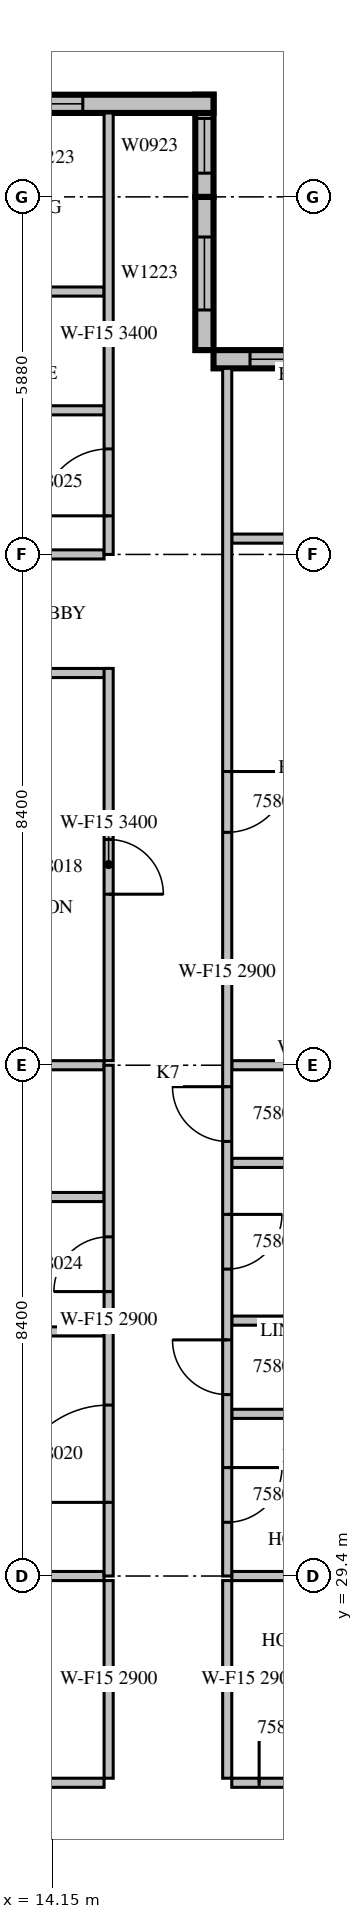
"""IFC4 building model, lengths in metres.
Left out: names, types, materials, properties, quantities, classifications, styles, units other than length and angle.
Written with IfcOpenShell. Run it as: python <this file> out.ifc"""

import sys

from ifc_helpers import new_model, si_unit, direction, frame, frame_2d, origin, place, context, subcontext, project, spatial, rectangle, extrude, source, transform, mapped, element, fill, save


model = new_model("IFC4")
c1 = context("Model", 3, precision=1e-05, world=origin(), true_north=direction((0.0, 1.0)))
c2 = subcontext(c1, "Body", "Model", "MODEL_VIEW")
j1 = project(units=[si_unit("LENGTHUNIT", "METRE"), si_unit("PLANEANGLEUNIT", "RADIAN")], contexts=[c1])
p1 = place(None, origin())
s1 = spatial("IfcSite", under=j1, at=p1, CompositionType="ELEMENT")
p2 = place(p1, origin())
s2 = spatial("IfcBuilding", under=s1, at=p2, CompositionType="ELEMENT")
p3 = place(p2, frame((0.0, 0.0, 253.8)))
s3 = spatial("IfcBuildingStorey", under=s2, at=p3, CompositionType="ELEMENT", Elevation=253.8)
m1 = source(origin(), c2, "Body", "SweptSolid", [
    extrude(rectangle(XDim=4.2, YDim=0.3, at=frame_2d((2.1, 0.0))), origin(), (0.0, 0.0, 1.0), 3.4),
])
p4 = place(p3, frame((21.0, 49.41, 0.0), z_axis=(0.0, 0.0, 1.0), x_axis=(-1.0, 0.0, 0.0)))
e1 = element("IfcWall", 1, at=p4, inside=s3, PredefinedType="STANDARD", context=c2, shape_type="MappedRepresentation", body=[
    mapped(m1, transform((0.0, 0.0, 0.0), scale=1.0)),
])
m2 = source(origin(), c2, "Body", "SweptSolid", [
    extrude(rectangle(XDim=3.0, YDim=2.3, at=frame_2d((1.5, 1.15))), frame((0.0, 0.16, 0.0), z_axis=(0.0, -1.0, 0.0), x_axis=(1.0, 0.0, 0.0)), (0.0, 0.0, 1.0), 0.32),
])
p5 = place(p4, frame((0.6, 0.0, 0.6)))
e2 = element("IfcOpeningElement", 2, at=p5, cuts=e1, PredefinedType="OPENING", context=c2, shape_type="MappedRepresentation", body=[
    mapped(m2, transform((0.0, 0.0, 0.0), scale=1.0)),
])
m3 = source(origin(), c2, "Body", "SweptSolid", [
    extrude(rectangle(XDim=2.52, YDim=0.3, at=frame_2d((1.26, 0.0))), origin(), (0.0, 0.0, 1.0), 3.4),
])
p6 = place(p3, frame((16.65, 49.56, 0.0), z_axis=(0.0, 0.0, 1.0), x_axis=(0.0, 1.0, 0.0)))
e3 = element("IfcWall", 3, at=p6, inside=s3, PredefinedType="STANDARD", context=c2, shape_type="MappedRepresentation", body=[
    mapped(m3, transform((0.0, 0.0, 0.0), scale=1.0)),
])
m4 = source(origin(), c2, "Body", "SweptSolid", [
    extrude(rectangle(XDim=1.2, YDim=2.3, at=frame_2d((0.6, 1.15))), frame((0.0, 0.16, 0.0), z_axis=(0.0, -1.0, 0.0), x_axis=(1.0, 0.0, 0.0)), (0.0, 0.0, 1.0), 0.32),
])
p7 = place(p6, frame((0.66, 0.0, 0.6)))
e4 = element("IfcOpeningElement", 4, at=p7, cuts=e3, PredefinedType="OPENING", context=c2, shape_type="MappedRepresentation", body=[
    mapped(m4, transform((0.0, 0.0, 0.0), scale=1.0)),
])
m5 = source(origin(), c2, "Body", "SweptSolid", [
    extrude(rectangle(XDim=1.68, YDim=0.3, at=frame_2d((0.84, 0.0))), origin(), (0.0, 0.0, 1.0), 3.4),
])
p8 = place(p3, frame((16.65, 52.08, 0.0), z_axis=(0.0, 0.0, 1.0), x_axis=(0.0, 1.0, 0.0)))
e5 = element("IfcWall", 5, at=p8, inside=s3, PredefinedType="STANDARD", context=c2, shape_type="MappedRepresentation", body=[
    mapped(m5, transform((0.0, 0.0, 0.0), scale=1.0)),
])
m6 = source(origin(), c2, "Body", "SweptSolid", [
    extrude(rectangle(XDim=0.9, YDim=2.3, at=frame_2d((0.45, 1.15))), frame((0.0, 0.16, 0.0), z_axis=(0.0, -1.0, 0.0), x_axis=(1.0, 0.0, 0.0)), (0.0, 0.0, 1.0), 0.32),
])
p9 = place(p8, frame((0.39, 0.0, 0.6)))
e6 = element("IfcOpeningElement", 6, at=p9, cuts=e5, PredefinedType="OPENING", context=c2, shape_type="MappedRepresentation", body=[
    mapped(m6, transform((0.0, 0.0, 0.0), scale=1.0)),
])
m7 = source(origin(), c2, "Body", "SweptSolid", [
    extrude(rectangle(XDim=10.5, YDim=0.3, at=frame_2d((5.25, 0.0))), origin(), (0.0, 0.0, 1.0), 3.4),
])
p10 = place(p3, frame((16.8, 53.61, 0.0), z_axis=(0.0, 0.0, 1.0), x_axis=(-1.0, 0.0, 0.0)))
e7 = element("IfcWall", 7, at=p10, inside=s3, PredefinedType="STANDARD", context=c2, shape_type="MappedRepresentation", body=[
    mapped(m7, transform((0.0, 0.0, 0.0), scale=1.0)),
])
p11 = place(p10, frame((2.15, 0.0, 0.6)))
e8 = element("IfcOpeningElement", 8, at=p11, cuts=e7, PredefinedType="OPENING", context=c2, shape_type="MappedRepresentation", body=[
    mapped(m4, transform((0.0, 0.0, 0.0), scale=1.0)),
])
m8 = source(origin(), c2, "Body", "SweptSolid", [
    extrude(rectangle(XDim=1.8, YDim=2.3, at=frame_2d((0.9, 1.15))), frame((0.0, 0.16, 0.0), z_axis=(0.0, -1.0, 0.0), x_axis=(1.0, 0.0, 0.0)), (0.0, 0.0, 1.0), 0.32),
])
p12 = place(p10, frame((8.025, 0.0, 0.6)))
e9 = element("IfcOpeningElement", 9, at=p12, cuts=e7, PredefinedType="OPENING", context=c2, shape_type="MappedRepresentation", body=[
    mapped(m8, transform((0.0, 0.0, 0.0), scale=1.0)),
])
m9 = source(origin(), c2, "Body", "SweptSolid", [
    extrude(rectangle(XDim=8.495, YDim=0.15, at=frame_2d((4.247, 0.0))), origin(), (0.0, 0.0, 1.0), 2.4),
])
p13 = place(p3, frame((6.505, 26.0, 0.0), z_axis=(0.0, 0.0, 1.0), x_axis=(1.0, 0.0, 0.0)))
e10 = element("IfcWall", 10, at=p13, inside=s3, PredefinedType="PARTITIONING", context=c2, shape_type="MappedRepresentation", body=[
    mapped(m9, transform((0.0, 0.0, 0.0), scale=1.0)),
])
m10 = source(origin(), c2, "Body", "SweptSolid", [
    extrude(rectangle(XDim=0.9, YDim=2.1, at=frame_2d((0.45, 1.05))), frame((0.0, 0.085, 0.0), z_axis=(0.0, -1.0, 0.0), x_axis=(1.0, 0.0, 0.0)), (0.0, 0.0, 1.0), 0.17),
])
p14 = place(p13, frame((1.395, 0.0, 0.0)))
e11 = element("IfcOpeningElement", 11, at=p14, cuts=e10, PredefinedType="OPENING", context=c2, shape_type="MappedRepresentation", body=[
    mapped(m10, transform((0.0, 0.0, 0.0), scale=1.0)),
])
p15 = place(p13, frame((6.47, 0.0, 0.0)))
e12 = element("IfcOpeningElement", 12, at=p15, cuts=e10, PredefinedType="OPENING", context=c2, shape_type="MappedRepresentation", body=[
    mapped(m10, transform((0.0, 0.0, 0.0), scale=1.0)),
])
m11 = source(origin(), c2, "Body", "SweptSolid", [
    extrude(rectangle(XDim=3.6, YDim=0.15, at=frame_2d((1.8, 0.0))), origin(), (0.0, 0.0, 1.0), 2.4),
])
p16 = place(p3, frame((17.1, 26.0, 0.0), z_axis=(0.0, 0.0, 1.0), x_axis=(1.0, 0.0, 0.0)))
e13 = element("IfcWall", 13, at=p16, inside=s3, PredefinedType="PARTITIONING", context=c2, shape_type="MappedRepresentation", body=[
    mapped(m11, transform((0.0, 0.0, 0.0), scale=1.0)),
])
p17 = place(p16, frame((0.45, 0.0, 0.0)))
e14 = element("IfcOpeningElement", 14, at=p17, cuts=e13, PredefinedType="OPENING", context=c2, shape_type="MappedRepresentation", body=[
    mapped(m10, transform((0.0, 0.0, 0.0), scale=1.0)),
])
p18 = place(p3, frame((15.075, 26.075, 0.0), z_axis=(0.0, 0.0, 1.0), x_axis=(0.0, 1.0, 0.0)))
e15 = element("IfcWall", 15, at=p18, inside=s3, PredefinedType="PARTITIONING", context=c2, shape_type="SweptSolid", body=[
    extrude(rectangle(XDim=3.25, YDim=0.15, at=frame_2d((1.625, 0.0))), origin(), (0.0, 0.0, 1.0), 2.9),
])
m12 = source(origin(), c2, "Body", "SweptSolid", [
    extrude(rectangle(XDim=3.25, YDim=0.15, at=frame_2d((1.625, 0.0))), origin(), (0.0, 0.0, 1.0), 2.9),
])
p19 = place(p3, frame((17.025, 29.325, 0.0), z_axis=(0.0, 0.0, 1.0), x_axis=(0.0, -1.0, 0.0)))
e16 = element("IfcWall", 16, at=p19, inside=s3, PredefinedType="PARTITIONING", context=c2, shape_type="MappedRepresentation", body=[
    mapped(m12, transform((0.0, 0.0, 0.0), scale=1.0)),
])
m13 = source(origin(), c2, "Body", "SweptSolid", [
    extrude(rectangle(XDim=4.101, YDim=0.15, at=frame_2d((2.05, 0.0))), origin(), (0.0, 0.0, 1.0), 3.4),
])
p20 = place(p3, frame((15.0, 29.4, 0.0), z_axis=(0.0, 0.0, 1.0), x_axis=(-1.0, 0.0, 0.0)))
e17 = element("IfcWall", 17, at=p20, inside=s3, PredefinedType="PARTITIONING", context=c2, shape_type="MappedRepresentation", body=[
    mapped(m13, transform((0.0, 0.0, 0.0), scale=1.0)),
])
m14 = source(origin(), c2, "Body", "SweptSolid", [
    extrude(rectangle(XDim=3.101, YDim=0.15, at=frame_2d((1.55, 0.0))), origin(), (0.0, 0.0, 1.0), 3.4),
])
p21 = place(p3, frame((20.201, 29.4, 0.0), z_axis=(0.0, 0.0, 1.0), x_axis=(-1.0, 0.0, 0.0)))
e18 = element("IfcWall", 18, at=p21, inside=s3, PredefinedType="PARTITIONING", context=c2, shape_type="MappedRepresentation", body=[
    mapped(m14, transform((0.0, 0.0, 0.0), scale=1.0)),
])
m15 = source(origin(), c2, "Body", "SweptSolid", [
    extrude(rectangle(XDim=2.775, YDim=0.15, at=frame_2d((1.387, 0.0))), origin(), (0.0, 0.0, 1.0), 3.4),
])
p22 = place(p3, frame((15.075, 44.25, 0.0), z_axis=(0.0, 0.0, 1.0), x_axis=(-1.0, 0.0, 0.0)))
e19 = element("IfcWall", 19, at=p22, inside=s3, PredefinedType="PARTITIONING", context=c2, shape_type="MappedRepresentation", body=[
    mapped(m15, transform((0.0, 0.0, 0.0), scale=1.0)),
])
m16 = source(origin(), c2, "Body", "SweptSolid", [
    extrude(rectangle(XDim=6.45, YDim=0.15, at=frame_2d((3.225, 0.0))), origin(), (0.0, 0.0, 1.0), 3.4),
])
p23 = place(p3, frame((15.075, 37.875, 0.0), z_axis=(0.0, 0.0, 1.0), x_axis=(0.0, 1.0, 0.0)))
e20 = element("IfcWall", 20, at=p23, inside=s3, PredefinedType="PARTITIONING", context=c2, shape_type="MappedRepresentation", body=[
    mapped(m16, transform((0.0, 0.0, 0.0), scale=1.0)),
])
p24 = place(p23, frame((2.737, 0.0, 0.0)))
e21 = element("IfcOpeningElement", 21, at=p24, cuts=e20, PredefinedType="OPENING", context=c2, shape_type="MappedRepresentation", body=[
    mapped(m10, transform((0.0, 0.0, 0.0), scale=1.0)),
])
m17 = source(origin(), c2, "Body", "SweptSolid", [
    extrude(rectangle(XDim=3.95, YDim=0.15, at=frame_2d((1.975, 0.0))), origin(), (0.0, 0.0, 1.0), 3.4),
])
for number, where, z_axis, x_axis in (
    (22, (15.0, 33.422, 0.0), (0.0, 0.0, 1.0), (-1.0, 0.0, 0.0)),
    (23, (15.0, 35.633, 0.0), (0.0, 0.0, 1.0), (-1.0, 0.0, 0.0)),
    (24, (15.0, 37.8, 0.0), (0.0, 0.0, 1.0), (-1.0, 0.0, 0.0)),
    (25, (15.0, 48.57, 0.0), (0.0, 0.0, 1.0), (-1.0, 0.0, 0.0)),
    (26, (15.0, 50.523, 0.0), (0.0, 0.0, 1.0), (-1.0, 0.0, 0.0)),
    (27, (15.0, 46.2, 0.0), (0.0, 0.0, 1.0), (-1.0, 0.0, 0.0)),
):
    element("IfcWall", number, at=place(p3, frame(where, z_axis=z_axis, x_axis=x_axis)), inside=s3, PredefinedType="PARTITIONING", context=c2, shape_type="MappedRepresentation", body=[
        mapped(m17, transform((0.0, 0.0, 0.0), scale=1.0)),
    ])
for number, where, z_axis, x_axis in (
    (28, (17.1, 32.067, 0.0), (0.0, 0.0, 1.0), (1.0, 0.0, 0.0)),
    (29, (17.1, 36.194, 0.0), (0.0, 0.0, 1.0), (1.0, 0.0, 0.0)),
):
    element("IfcWall", number, at=place(p3, frame(where, z_axis=z_axis, x_axis=x_axis)), inside=s3, PredefinedType="PARTITIONING", context=c2, shape_type="MappedRepresentation", body=[
        mapped(m11, transform((0.0, 0.0, 0.0), scale=1.0)),
    ])
p25 = place(p3, frame((17.1, 46.46, 0.0), z_axis=(0.0, 0.0, 1.0), x_axis=(1.0, 0.0, 0.0)))
e30 = element("IfcWall", 30, at=p25, inside=s3, PredefinedType="PARTITIONING", context=c2, shape_type="MappedRepresentation", body=[
    mapped(m14, transform((0.0, 0.0, 0.0), scale=1.0)),
])
p26 = place(p25, frame((1.35, 0.0, 0.0)))
e31 = element("IfcOpeningElement", 31, at=p26, cuts=e30, PredefinedType="OPENING", context=c2, shape_type="MappedRepresentation", body=[
    mapped(m10, transform((0.0, 0.0, 0.0), scale=1.0)),
])
p27 = place(p3, frame((20.7, 33.6, 0.0), z_axis=(0.0, 0.0, 1.0), x_axis=(-1.0, 0.0, 0.0)))
e32 = element("IfcWall", 32, at=p27, inside=s3, PredefinedType="PARTITIONING", context=c2, shape_type="MappedRepresentation", body=[
    mapped(m11, transform((0.0, 0.0, 0.0), scale=1.0)),
])
p28 = place(p3, frame((20.201, 37.8, 0.0), z_axis=(0.0, 0.0, 1.0), x_axis=(-1.0, 0.0, 0.0)))
e33 = element("IfcWall", 33, at=p28, inside=s3, PredefinedType="PARTITIONING", context=c2, shape_type="MappedRepresentation", body=[
    mapped(m14, transform((0.0, 0.0, 0.0), scale=1.0)),
])
m18 = source(origin(), c2, "Body", "SweptSolid", [
    extrude(rectangle(XDim=8.4, YDim=0.15, at=frame_2d((4.2, 0.0))), origin(), (0.0, 0.0, 1.0), 2.9),
])
p29 = place(p3, frame((15.075, 29.4, 0.0), z_axis=(0.0, 0.0, 1.0), x_axis=(0.0, 1.0, 0.0)))
e34 = element("IfcWall", 34, at=p29, inside=s3, PredefinedType="PARTITIONING", context=c2, shape_type="MappedRepresentation", body=[
    mapped(m18, transform((0.0, 0.0, 0.0), scale=1.0)),
])
m19 = source(origin(), c2, "Body", "SweptSolid", [
    extrude(rectangle(XDim=1.6, YDim=2.1, at=frame_2d((0.8, 1.05))), frame((0.0, 0.085, 0.0), z_axis=(0.0, -1.0, 0.0), x_axis=(1.0, 0.0, 0.0)), (0.0, 0.0, 1.0), 0.17),
])
p30 = place(p29, frame((1.211, 0.0, 0.0)))
e35 = element("IfcOpeningElement", 35, at=p30, cuts=e34, PredefinedType="OPENING", context=c2, shape_type="MappedRepresentation", body=[
    mapped(m19, transform((0.0, 0.0, 0.0), scale=1.0)),
])
p31 = place(p29, frame((4.678, 0.0, 0.0)))
e36 = element("IfcOpeningElement", 36, at=p31, cuts=e34, PredefinedType="OPENING", context=c2, shape_type="MappedRepresentation", body=[
    mapped(m10, transform((0.0, 0.0, 0.0), scale=1.0)),
])
m20 = source(origin(), c2, "Body", "SweptSolid", [
    extrude(rectangle(XDim=7.26, YDim=0.15, at=frame_2d((3.63, 0.0))), origin(), (0.0, 0.0, 1.0), 3.4),
])
p32 = place(p3, frame((15.075, 46.2, 0.0), z_axis=(0.0, 0.0, 1.0), x_axis=(0.0, 1.0, 0.0)))
e37 = element("IfcWall", 37, at=p32, inside=s3, PredefinedType="PARTITIONING", context=c2, shape_type="MappedRepresentation", body=[
    mapped(m20, transform((0.0, 0.0, 0.0), scale=1.0)),
])
m21 = source(origin(), c2, "Body", "SweptSolid", [
    extrude(rectangle(XDim=1.1, YDim=2.1, at=frame_2d((0.55, 1.05))), frame((0.0, 0.085, 0.0), z_axis=(0.0, -1.0, 0.0), x_axis=(1.0, 0.0, 0.0)), (0.0, 0.0, 1.0), 0.17),
])
p33 = place(p32, frame((0.635, 0.0, 0.0)))
e38 = element("IfcOpeningElement", 38, at=p33, cuts=e37, PredefinedType="OPENING", context=c2, shape_type="MappedRepresentation", body=[
    mapped(m21, transform((0.0, 0.0, 0.0), scale=1.0)),
])
m22 = source(origin(), c2, "Body", "SweptSolid", [
    extrude(rectangle(XDim=19.86, YDim=0.15, at=frame_2d((9.93, 0.0))), origin(), (0.0, 0.0, 1.0), 2.9),
])
p34 = place(p3, frame((17.025, 49.26, 0.0), z_axis=(0.0, 0.0, 1.0), x_axis=(0.0, -1.0, 0.0)))
e39 = element("IfcWall", 39, at=p34, inside=s3, PredefinedType="PARTITIONING", context=c2, shape_type="MappedRepresentation", body=[
    mapped(m22, transform((0.0, 0.0, 0.0), scale=1.0)),
])
p35 = place(p34, frame((18.076, 0.0, 0.0)))
e40 = element("IfcOpeningElement", 40, at=p35, cuts=e39, PredefinedType="OPENING", context=c2, shape_type="MappedRepresentation", body=[
    mapped(m10, transform((0.0, 0.0, 0.0), scale=1.0)),
])
p36 = place(p34, frame((15.976, 0.0, 0.0)))
e41 = element("IfcOpeningElement", 41, at=p36, cuts=e39, PredefinedType="OPENING", context=c2, shape_type="MappedRepresentation", body=[
    mapped(m10, transform((0.0, 0.0, 0.0), scale=1.0)),
])
p37 = place(p34, frame((13.913, 0.0, 0.0)))
e42 = element("IfcOpeningElement", 42, at=p37, cuts=e39, PredefinedType="OPENING", context=c2, shape_type="MappedRepresentation", body=[
    mapped(m10, transform((0.0, 0.0, 0.0), scale=1.0)),
])
p38 = place(p34, frame((11.813, 0.0, 0.0)))
e43 = element("IfcOpeningElement", 43, at=p38, cuts=e39, PredefinedType="OPENING", context=c2, shape_type="MappedRepresentation", body=[
    mapped(m10, transform((0.0, 0.0, 0.0), scale=1.0)),
])
m23 = source(origin(), c2, "Body", "SweptSolid", [
    extrude(rectangle(XDim=1.0, YDim=2.1, at=frame_2d((0.5, 1.05))), frame((0.0, 0.085, 0.0), z_axis=(0.0, -1.0, 0.0), x_axis=(1.0, 0.0, 0.0)), (0.0, 0.0, 1.0), 0.17),
])
p39 = place(p34, frame((6.63, 0.0, 0.0)))
e44 = element("IfcOpeningElement", 44, at=p39, cuts=e39, PredefinedType="OPENING", context=c2, shape_type="MappedRepresentation", body=[
    mapped(m23, transform((0.0, 0.0, 0.0), scale=1.0)),
])
m24 = source(origin(), c2, "Body", "SweptSolid", [
    extrude(rectangle(XDim=3.0, YDim=2.3, at=frame_2d((1.5, 1.15))), frame((0.0, 0.03, 0.0), z_axis=(0.0, -1.0, 0.0), x_axis=(1.0, 0.0, 0.0)), (0.0, 0.0, 1.0), 0.06),
])
p40 = place(p5, origin())
e45 = element("IfcWindow", 45, at=p40, inside=s3, PartitioningType="SINGLE_PANEL", PredefinedType="WINDOW", context=c2, shape_type="MappedRepresentation", body=[
    mapped(m24, transform((0.0, 0.0, 0.0), scale=1.0)),
])
fill(e2, e45)
m25 = source(origin(), c2, "Body", "SweptSolid", [
    extrude(rectangle(XDim=1.2, YDim=2.3, at=frame_2d((0.6, 1.15))), frame((0.0, 0.03, 0.0), z_axis=(0.0, -1.0, 0.0), x_axis=(1.0, 0.0, 0.0)), (0.0, 0.0, 1.0), 0.06),
])
p41 = place(p7, origin())
e46 = element("IfcWindow", 46, at=p41, inside=s3, PartitioningType="SINGLE_PANEL", PredefinedType="WINDOW", context=c2, shape_type="MappedRepresentation", body=[
    mapped(m25, transform((0.0, 0.0, 0.0), scale=1.0)),
])
fill(e4, e46)
m26 = source(origin(), c2, "Body", "SweptSolid", [
    extrude(rectangle(XDim=0.9, YDim=2.3, at=frame_2d((0.45, 1.15))), frame((0.0, 0.03, 0.0), z_axis=(0.0, -1.0, 0.0), x_axis=(1.0, 0.0, 0.0)), (0.0, 0.0, 1.0), 0.06),
])
p42 = place(p9, origin())
e47 = element("IfcWindow", 47, at=p42, inside=s3, PartitioningType="SINGLE_PANEL", PredefinedType="WINDOW", context=c2, shape_type="MappedRepresentation", body=[
    mapped(m26, transform((0.0, 0.0, 0.0), scale=1.0)),
])
fill(e6, e47)
p43 = place(p11, origin())
e48 = element("IfcWindow", 48, at=p43, inside=s3, PartitioningType="SINGLE_PANEL", PredefinedType="WINDOW", context=c2, shape_type="MappedRepresentation", body=[
    mapped(m25, transform((0.0, 0.0, 0.0), scale=1.0)),
])
fill(e8, e48)
m27 = source(origin(), c2, "Body", "SweptSolid", [
    extrude(rectangle(XDim=0.9, YDim=2.1, at=frame_2d((0.45, 1.05))), frame((0.0, 0.025, 0.0), z_axis=(0.0, -1.0, 0.0), x_axis=(1.0, 0.0, 0.0)), (0.0, 0.0, 1.0), 0.05),
])
p44 = place(p17, origin())
e49 = element("IfcDoor", 49, at=p44, inside=s3, OperationType="SINGLE_SWING_LEFT", PredefinedType="DOOR", context=c2, shape_type="MappedRepresentation", body=[
    mapped(m27, transform((0.0, 0.0, 0.0), scale=1.0)),
])
fill(e14, e49)
p45 = place(p24, origin())
e50 = element("IfcDoor", 50, at=p45, inside=s3, OperationType="SINGLE_SWING_RIGHT", PredefinedType="DOOR", context=c2, shape_type="MappedRepresentation", body=[
    mapped(m27, transform((0.0, 0.0, 0.0), scale=1.0)),
])
fill(e21, e50)
m28 = source(origin(), c2, "Body", "SweptSolid", [
    extrude(rectangle(XDim=1.6, YDim=2.1, at=frame_2d((0.8, 1.05))), frame((0.0, 0.025, 0.0), z_axis=(0.0, -1.0, 0.0), x_axis=(1.0, 0.0, 0.0)), (0.0, 0.0, 1.0), 0.05),
])
p46 = place(p30, origin())
e51 = element("IfcDoor", 51, at=p46, inside=s3, OperationType="SINGLE_SWING_LEFT", PredefinedType="DOOR", context=c2, shape_type="MappedRepresentation", body=[
    mapped(m28, transform((0.0, 0.0, 0.0), scale=1.0)),
])
fill(e35, e51)
p47 = place(p31, origin())
e52 = element("IfcDoor", 52, at=p47, inside=s3, OperationType="SINGLE_SWING_LEFT", PredefinedType="DOOR", context=c2, shape_type="MappedRepresentation", body=[
    mapped(m27, transform((0.0, 0.0, 0.0), scale=1.0)),
])
fill(e36, e52)
m29 = source(origin(), c2, "Body", "SweptSolid", [
    extrude(rectangle(XDim=1.1, YDim=2.1, at=frame_2d((0.55, 1.05))), frame((0.0, 0.025, 0.0), z_axis=(0.0, -1.0, 0.0), x_axis=(1.0, 0.0, 0.0)), (0.0, 0.0, 1.0), 0.05),
])
p48 = place(p33, origin())
e53 = element("IfcDoor", 53, at=p48, inside=s3, OperationType="SINGLE_SWING_LEFT", PredefinedType="DOOR", context=c2, shape_type="MappedRepresentation", body=[
    mapped(m29, transform((0.0, 0.0, 0.0), scale=1.0)),
])
fill(e38, e53)
p49 = place(p35, origin())
e54 = element("IfcDoor", 54, at=p49, inside=s3, OperationType="SINGLE_SWING_LEFT", PredefinedType="DOOR", context=c2, shape_type="MappedRepresentation", body=[
    mapped(m27, transform((0.0, 0.0, 0.0), scale=1.0)),
])
fill(e40, e54)
p50 = place(p36, origin())
e55 = element("IfcDoor", 55, at=p50, inside=s3, OperationType="SINGLE_SWING_RIGHT", PredefinedType="DOOR", context=c2, shape_type="MappedRepresentation", body=[
    mapped(m27, transform((0.0, 0.0, 0.0), scale=1.0)),
])
fill(e41, e55)
p51 = place(p37, origin())
e56 = element("IfcDoor", 56, at=p51, inside=s3, OperationType="SINGLE_SWING_LEFT", PredefinedType="DOOR", context=c2, shape_type="MappedRepresentation", body=[
    mapped(m27, transform((0.0, 0.0, 0.0), scale=1.0)),
])
fill(e42, e56)
p52 = place(p38, origin())
e57 = element("IfcDoor", 57, at=p52, inside=s3, OperationType="SINGLE_SWING_RIGHT", PredefinedType="DOOR", context=c2, shape_type="MappedRepresentation", body=[
    mapped(m27, transform((0.0, 0.0, 0.0), scale=1.0)),
])
fill(e43, e57)
m30 = source(origin(), c2, "Body", "SweptSolid", [
    extrude(rectangle(XDim=1.0, YDim=2.1, at=frame_2d((0.5, 1.05))), frame((0.0, 0.025, 0.0), z_axis=(0.0, -1.0, 0.0), x_axis=(1.0, 0.0, 0.0)), (0.0, 0.0, 1.0), 0.05),
])
p53 = place(p39, origin())
e58 = element("IfcDoor", 58, at=p53, inside=s3, OperationType="SINGLE_SWING_LEFT", PredefinedType="DOOR", context=c2, shape_type="MappedRepresentation", body=[
    mapped(m30, transform((0.0, 0.0, 0.0), scale=1.0)),
])
fill(e44, e58)
save(model, sys.argv[1])
